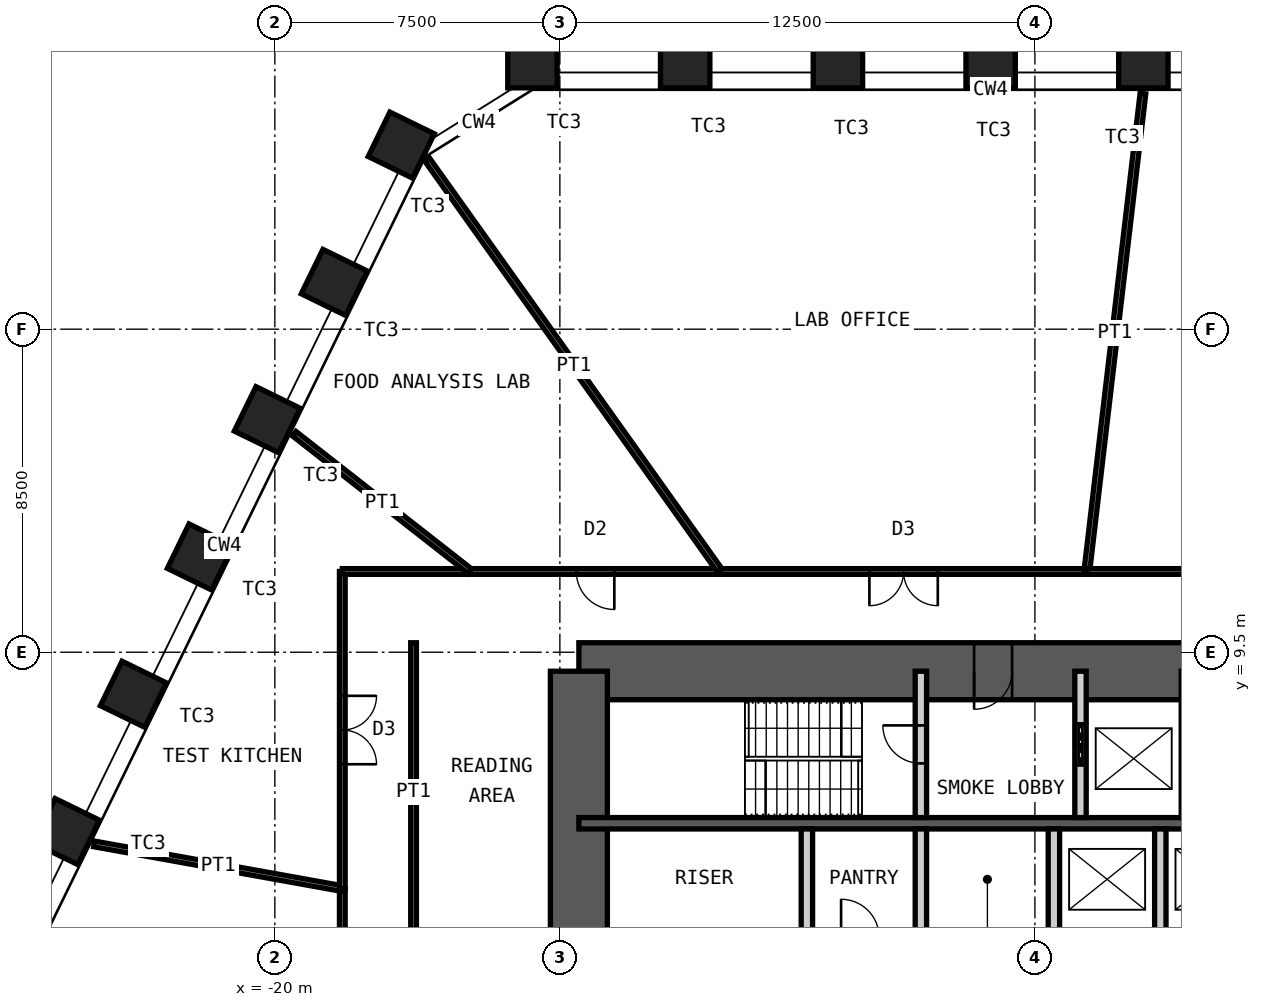
"""IFC4 building model, lengths in metres.
Left out: names, types, materials, properties, quantities, classifications, styles, units other than length and angle.
Written with IfcOpenShell. Run it as: python <this file> out.ifc"""

import sys

from ifc_helpers import new_model, si_unit, direction, frame, frame_2d, origin, origin_2d, place, context, subcontext, project, spatial, rectangle, hollow_rectangle, extrude, element, fill, save


model = new_model("IFC4")
c1 = context("Model", 3, precision=1e-05, world=origin(), true_north=direction((0.0, 1.0)))
c2 = subcontext(c1, "Body", "Model", "MODEL_VIEW")
j1 = project(units=[si_unit("LENGTHUNIT", "METRE"), si_unit("PLANEANGLEUNIT", "RADIAN")], contexts=[c1])
p1 = place(None, origin())
s1 = spatial("IfcSite", under=j1, at=p1, CompositionType="ELEMENT")
p2 = place(p1, origin())
s2 = spatial("IfcBuilding", under=s1, at=p2, CompositionType="ELEMENT")
p3 = place(p2, frame((0.0, 0.0, 128.2)))
s3 = spatial("IfcBuildingStorey", under=s2, at=p3, CompositionType="ELEMENT", Elevation=128.2)
for number, where, z_axis, x_axis in (
    (1, (-13.222, 25.0, 0.0), (0.0, 0.0, 1.0), (-1.0, 0.0, 0.0)),
    (2, (-9.203, 25.0, 0.0), (0.0, 0.0, 1.0), (-1.0, 0.0, 0.0)),
    (3, (-5.184, 25.0, 0.0), (0.0, 0.0, 1.0), (-1.0, 0.0, 0.0)),
    (4, (-1.165, 25.0, 0.0), (0.0, 0.0, 1.0), (-1.0, 0.0, 0.0)),
    (5, (2.854, 25.0, 0.0), (0.0, 0.0, 1.0), (-1.0, 0.0, 0.0)),
    (6, (-25.483, 4.781, 0.0), (0.0, 0.0, 1.0), (-0.438, -0.899, 0.0)),
    (7, (-23.721, 8.394, 0.0), (0.0, 0.0, 1.0), (-0.438, -0.899, 0.0)),
    (8, (-21.959, 12.006, 0.0), (0.0, 0.0, 1.0), (-0.438, -0.899, 0.0)),
    (9, (-20.198, 15.618, 0.0), (0.0, 0.0, 1.0), (-0.438, -0.899, 0.0)),
    (10, (-18.436, 19.23, 0.0), (0.0, 0.0, 1.0), (-0.438, -0.899, 0.0)),
    (11, (-16.674, 22.843, 0.0), (0.0, 0.0, 1.0), (-0.438, -0.899, 0.0)),
):
    element("IfcColumn", number, at=place(p3, frame(where, z_axis=z_axis, x_axis=x_axis)), inside=s3, PredefinedType="COLUMN", context=c2, shape_type="SweptSolid", body=[
        extrude(hollow_rectangle(XDim=1.3, YDim=1.3, WallThickness=0.1, at=origin_2d()), origin(), (0.0, 0.0, 1.0), 4.2),
    ])
p4 = place(p3, frame((-12.0, 9.0, 0.0), z_axis=(0.0, 0.0, 1.0), x_axis=(1.0, 0.0, 0.0)))
e12 = element("IfcWall", 12, at=p4, inside=s3, PredefinedType="SHEAR", context=c2, shape_type="SweptSolid", body=[
    extrude(rectangle(XDim=24.0, YDim=1.5, at=frame_2d((12.0, 0.0))), origin(), (0.0, 0.0, 1.0), 4.2),
])
p5 = place(p4, frame((10.4, 0.0, 0.0)))
e13 = element("IfcOpeningElement", 13, at=p5, cuts=e12, PredefinedType="OPENING", context=c2, shape_type="SweptSolid", body=[
    extrude(rectangle(XDim=1.0, YDim=2.1, at=frame_2d((0.5, 1.05))), frame((0.0, 0.76, 0.0), z_axis=(0.0, -1.0, 0.0), x_axis=(1.0, 0.0, 0.0)), (0.0, 0.0, 1.0), 1.52),
])
p6 = place(p4, frame((17.6, 0.0, 0.0)))
e14 = element("IfcOpeningElement", 14, at=p6, cuts=e12, PredefinedType="OPENING", context=c2, shape_type="SweptSolid", body=[
    extrude(rectangle(XDim=0.9, YDim=2.1, at=frame_2d((0.45, 1.05))), frame((0.0, 0.76, 0.0), z_axis=(0.0, -1.0, 0.0), x_axis=(1.0, 0.0, 0.0)), (0.0, 0.0, 1.0), 1.52),
])
p7 = place(p4, frame((21.9, 0.0, 0.0)))
e15 = element("IfcOpeningElement", 15, at=p7, cuts=e12, PredefinedType="OPENING", context=c2, shape_type="SweptSolid", body=[
    extrude(rectangle(XDim=0.9, YDim=2.1, at=frame_2d((0.45, 1.05))), frame((0.0, 0.76, 0.0), z_axis=(0.0, -1.0, 0.0), x_axis=(1.0, 0.0, 0.0)), (0.0, 0.0, 1.0), 1.52),
])
p8 = place(p3, frame((-12.0, -9.0, 0.0), z_axis=(0.0, 0.0, 1.0), x_axis=(0.0, 1.0, 0.0)))
e16 = element("IfcWall", 16, at=p8, inside=s3, PredefinedType="SHEAR", context=c2, shape_type="SweptSolid", body=[
    extrude(rectangle(XDim=18.0, YDim=1.5, at=frame_2d((9.0, 0.0))), origin(), (0.0, 0.0, 1.0), 4.2),
])
p9 = place(p8, frame((8.1, 0.0, 0.0)))
e17 = element("IfcOpeningElement", 17, at=p9, cuts=e16, PredefinedType="OPENING", context=c2, shape_type="SweptSolid", body=[
    extrude(rectangle(XDim=1.8, YDim=2.1, at=frame_2d((0.9, 1.05))), frame((0.0, 0.76, 0.0), z_axis=(0.0, -1.0, 0.0), x_axis=(1.0, 0.0, 0.0)), (0.0, 0.0, 1.0), 1.52),
])
p10 = place(p3, frame((-12.0, 5.0, 0.0), z_axis=(0.0, 0.0, 1.0), x_axis=(1.0, 0.0, 0.0)))
e18 = element("IfcWall", 18, at=p10, inside=s3, PredefinedType="SHEAR", context=c2, shape_type="SweptSolid", body=[
    extrude(rectangle(XDim=24.0, YDim=0.3, at=frame_2d((12.0, 0.0))), origin(), (0.0, 0.0, 1.0), 4.2),
])
p11 = place(p3, frame((-3.0, 5.15, 0.0), z_axis=(0.0, 0.0, 1.0), x_axis=(0.0, 1.0, 0.0)))
e19 = element("IfcWall", 19, at=p11, inside=s3, PredefinedType="PARTITIONING", context=c2, shape_type="SweptSolid", body=[
    extrude(rectangle(XDim=3.85, YDim=0.3, at=frame_2d((1.925, 0.0))), origin(), (0.0, 0.0, 1.0), 3.98),
])
p12 = place(p11, frame((1.425, 0.0, 0.0)))
e20 = element("IfcOpeningElement", 20, at=p12, cuts=e19, PredefinedType="OPENING", context=c2, shape_type="SweptSolid", body=[
    extrude(rectangle(XDim=1.0, YDim=2.1, at=frame_2d((0.5, 1.05))), frame((0.0, 0.16, 0.0), z_axis=(0.0, -1.0, 0.0), x_axis=(1.0, 0.0, 0.0)), (0.0, 0.0, 1.0), 0.32),
])
p13 = place(p3, frame((1.2, 5.15, 0.0), z_axis=(0.0, 0.0, 1.0), x_axis=(0.0, 1.0, 0.0)))
e21 = element("IfcWall", 21, at=p13, inside=s3, PredefinedType="PARTITIONING", context=c2, shape_type="SweptSolid", body=[
    extrude(rectangle(XDim=3.85, YDim=0.3, at=frame_2d((1.925, 0.0))), origin(), (0.0, 0.0, 1.0), 3.98),
])
p14 = place(p13, frame((1.375, 0.0, 0.0)))
e22 = element("IfcOpeningElement", 22, at=p14, cuts=e21, PredefinedType="OPENING", context=c2, shape_type="SweptSolid", body=[
    extrude(rectangle(XDim=1.1, YDim=2.4, at=frame_2d((0.55, 1.2))), frame((0.0, 0.16, 0.0), z_axis=(0.0, -1.0, 0.0), x_axis=(1.0, 0.0, 0.0)), (0.0, 0.0, 1.0), 0.32),
])
p15 = place(p3, frame((4.0, 5.15, 0.0), z_axis=(0.0, 0.0, 1.0), x_axis=(0.0, 1.0, 0.0)))
e23 = element("IfcWall", 23, at=p15, inside=s3, PredefinedType="PARTITIONING", context=c2, shape_type="SweptSolid", body=[
    extrude(rectangle(XDim=3.85, YDim=0.3, at=frame_2d((1.925, 0.0))), origin(), (0.0, 0.0, 1.0), 3.98),
])
for number, where, z_axis, x_axis in (
    (24, (-6.0, 2.2, 0.0), (0.0, 0.0, 1.0), (0.0, 1.0, 0.0)),
    (25, (-3.0, 2.2, 0.0), (0.0, 0.0, 1.0), (0.0, 1.0, 0.0)),
    (26, (0.5, 2.2, 0.0), (0.0, 0.0, 1.0), (0.0, 1.0, 0.0)),
    (27, (3.3, 2.2, 0.0), (0.0, 0.0, 1.0), (0.0, 1.0, 0.0)),
):
    element("IfcWall", number, at=place(p3, frame(where, z_axis=z_axis, x_axis=x_axis)), inside=s3, PredefinedType="PARTITIONING", context=c2, shape_type="SweptSolid", body=[
        extrude(rectangle(XDim=2.65, YDim=0.3, at=frame_2d((1.325, 0.0))), origin(), (0.0, 0.0, 1.0), 3.98),
    ])
p16 = place(p3, frame((-18.225, -7.849, 0.0), z_axis=(0.0, 0.0, 1.0), x_axis=(0.0, 1.0, 0.0)))
e28 = element("IfcWall", 28, at=p16, inside=s3, PredefinedType="PARTITIONING", context=c2, shape_type="SweptSolid", body=[
    extrude(rectangle(XDim=11.13, YDim=0.15, at=frame_2d((5.565, 0.0))), origin(), (0.0, 0.0, 1.0), 4.03),
])
p17 = place(p16, frame((4.665, 0.0, 0.0)))
e29 = element("IfcOpeningElement", 29, at=p17, cuts=e28, PredefinedType="OPENING", context=c2, shape_type="SweptSolid", body=[
    extrude(rectangle(XDim=1.8, YDim=2.4, at=frame_2d((0.9, 1.2))), frame((0.0, 0.085, 0.0), z_axis=(0.0, -1.0, 0.0), x_axis=(1.0, 0.0, 0.0)), (0.0, 0.0, 1.0), 0.17),
])
p18 = place(p3, frame((-24.755, 4.457, 0.0), z_axis=(0.0, 0.0, 1.0), x_axis=(0.984174598206, -0.177201467959, 0.0)))
e30 = element("IfcWall", 30, at=p18, inside=s3, PredefinedType="PARTITIONING", context=c2, shape_type="SweptSolid", body=[
    extrude(rectangle(XDim=6.635, YDim=0.15, at=frame_2d((3.318, 0.0))), origin(), (0.0, 0.0, 1.0), 3.33),
])
p19 = place(p3, frame((-18.225, 3.281, 0.0), z_axis=(0.0, 0.0, 1.0), x_axis=(0.0, 1.0, 0.0)))
e31 = element("IfcWall", 31, at=p19, inside=s3, PredefinedType="PARTITIONING", context=c2, shape_type="SweptSolid", body=[
    extrude(rectangle(XDim=8.344, YDim=0.15, at=frame_2d((4.172, 0.0))), origin(), (0.0, 0.0, 1.0), 4.03),
])
p20 = place(p19, frame((3.272, 0.0, 0.0)))
e32 = element("IfcOpeningElement", 32, at=p20, cuts=e31, PredefinedType="OPENING", context=c2, shape_type="SweptSolid", body=[
    extrude(rectangle(XDim=1.8, YDim=2.4, at=frame_2d((0.9, 1.2))), frame((0.0, 0.085, 0.0), z_axis=(0.0, -1.0, 0.0), x_axis=(1.0, 0.0, 0.0)), (0.0, 0.0, 1.0), 0.17),
])
p21 = place(p3, frame((-18.225, 11.625, 0.0), z_axis=(0.0, 0.0, 1.0), x_axis=(1.0, 0.0, 0.0)))
e33 = element("IfcWall", 33, at=p21, inside=s3, PredefinedType="PARTITIONING", context=c2, shape_type="SweptSolid", body=[
    extrude(rectangle(XDim=3.368, YDim=0.15, at=frame_2d((1.684, 0.0))), origin(), (0.0, 0.0, 1.0), 4.03),
])
p22 = place(p3, frame((-19.49, 15.25, 0.0), z_axis=(0.0, 0.0, 1.0), x_axis=(0.787549668605, -0.616251182133, 0.0)))
e34 = element("IfcWall", 34, at=p22, inside=s3, PredefinedType="PARTITIONING", context=c2, shape_type="SweptSolid", body=[
    extrude(rectangle(XDim=5.882, YDim=0.15, at=frame_2d((2.941, 0.0))), origin(), (0.0, 0.0, 1.0), 3.33),
])
p23 = place(p3, frame((-14.857, 11.625, 0.0), z_axis=(0.0, 0.0, 1.0), x_axis=(1.0, 0.0, 0.0)))
e35 = element("IfcWall", 35, at=p23, inside=s3, PredefinedType="PARTITIONING", context=c2, shape_type="SweptSolid", body=[
    extrude(rectangle(XDim=6.581, YDim=0.15, at=frame_2d((3.29, 0.0))), origin(), (0.0, 0.0, 1.0), 4.03),
])
p24 = place(p23, frame((2.79, 0.0, 0.0)))
e36 = element("IfcOpeningElement", 36, at=p24, cuts=e35, PredefinedType="OPENING", context=c2, shape_type="SweptSolid", body=[
    extrude(rectangle(XDim=1.0, YDim=2.4, at=frame_2d((0.5, 1.2))), frame((0.0, 0.085, 0.0), z_axis=(0.0, -1.0, 0.0), x_axis=(1.0, 0.0, 0.0)), (0.0, 0.0, 1.0), 0.17),
])
p25 = place(p3, frame((-15.987, 22.455, 0.0), z_axis=(0.0, 0.0, 1.0), x_axis=(0.579969304452, -0.814638328274, 0.0)))
e37 = element("IfcWall", 37, at=p25, inside=s3, PredefinedType="PARTITIONING", context=c2, shape_type="SweptSolid", body=[
    extrude(rectangle(XDim=13.294, YDim=0.15, at=frame_2d((6.647, 0.0))), origin(), (0.0, 0.0, 1.0), 2.93),
])
p26 = place(p3, frame((-8.277, 11.625, 0.0), z_axis=(0.0, 0.0, 1.0), x_axis=(1.0, 0.0, 0.0)))
e38 = element("IfcWall", 38, at=p26, inside=s3, PredefinedType="PARTITIONING", context=c2, shape_type="SweptSolid", body=[
    extrude(rectangle(XDim=9.642, YDim=0.15, at=frame_2d((4.821, 0.0))), origin(), (0.0, 0.0, 1.0), 4.03),
])
p27 = place(p26, frame((3.921, 0.0, 0.0)))
e39 = element("IfcOpeningElement", 39, at=p27, cuts=e38, PredefinedType="OPENING", context=c2, shape_type="SweptSolid", body=[
    extrude(rectangle(XDim=1.8, YDim=2.4, at=frame_2d((0.9, 1.2))), frame((0.0, 0.085, 0.0), z_axis=(0.0, -1.0, 0.0), x_axis=(1.0, 0.0, 0.0)), (0.0, 0.0, 1.0), 0.17),
])
p28 = place(p3, frame((2.843, 24.201, 0.0), z_axis=(0.0, 0.0, 1.0), x_axis=(-0.116670084723, -0.993170726175, 0.0)))
e40 = element("IfcWall", 40, at=p28, inside=s3, PredefinedType="PARTITIONING", context=c2, shape_type="SweptSolid", body=[
    extrude(rectangle(XDim=12.662, YDim=0.15, at=frame_2d((6.331, 0.0))), origin(), (0.0, 0.0, 1.0), 3.33),
])
p29 = place(p3, frame((1.366, 11.625, 0.0), z_axis=(0.0, 0.0, 1.0), x_axis=(1.0, 0.0, 0.0)))
e41 = element("IfcWall", 41, at=p29, inside=s3, PredefinedType="PARTITIONING", context=c2, shape_type="SweptSolid", body=[
    extrude(rectangle(XDim=16.259, YDim=0.15, at=frame_2d((8.13, 0.0))), origin(), (0.0, 0.0, 1.0), 4.03),
])
p30 = place(p29, frame((7.23, 0.0, 0.0)))
e42 = element("IfcOpeningElement", 42, at=p30, cuts=e41, PredefinedType="OPENING", context=c2, shape_type="SweptSolid", body=[
    extrude(rectangle(XDim=1.8, YDim=2.4, at=frame_2d((0.9, 1.2))), frame((0.0, 0.085, 0.0), z_axis=(0.0, -1.0, 0.0), x_axis=(1.0, 0.0, 0.0)), (0.0, 0.0, 1.0), 0.17),
])
p31 = place(p3, frame((-16.35, 1.9, 0.0), z_axis=(0.0, 0.0, 1.0), x_axis=(0.0, 1.0, 0.0)))
e43 = element("IfcWall", 43, at=p31, inside=s3, PredefinedType="PARTITIONING", context=c2, shape_type="SweptSolid", body=[
    extrude(rectangle(XDim=7.85, YDim=0.15, at=frame_2d((3.925, 0.0))), origin(), (0.0, 0.0, 1.0), 4.03),
])
p32 = place(p5, origin())
e44 = element("IfcDoor", 44, at=p32, inside=s3, OperationType="SINGLE_SWING_LEFT", PredefinedType="DOOR", context=c2, shape_type="SweptSolid", body=[
    extrude(rectangle(XDim=1.0, YDim=2.1, at=frame_2d((0.5, 1.05))), frame((0.0, 0.025, 0.0), z_axis=(0.0, -1.0, 0.0), x_axis=(1.0, 0.0, 0.0)), (0.0, 0.0, 1.0), 0.05),
])
fill(e13, e44)
p33 = place(p12, origin())
e45 = element("IfcDoor", 45, at=p33, inside=s3, OperationType="SINGLE_SWING_LEFT", PredefinedType="DOOR", context=c2, shape_type="SweptSolid", body=[
    extrude(rectangle(XDim=1.0, YDim=2.1, at=frame_2d((0.5, 1.05))), frame((0.0, 0.025, 0.0), z_axis=(0.0, -1.0, 0.0), x_axis=(1.0, 0.0, 0.0)), (0.0, 0.0, 1.0), 0.05),
])
fill(e20, e45)
p34 = place(p14, origin())
e46 = element("IfcDoor", 46, at=p34, inside=s3, OperationType="DOUBLE_DOOR_SLIDING", PredefinedType="DOOR", context=c2, shape_type="SweptSolid", body=[
    extrude(rectangle(XDim=1.1, YDim=2.4, at=frame_2d((0.55, 1.2))), frame((0.0, 0.025, 0.0), z_axis=(0.0, -1.0, 0.0), x_axis=(1.0, 0.0, 0.0)), (0.0, 0.0, 1.0), 0.05),
])
fill(e22, e46)
p35 = place(p20, origin())
e47 = element("IfcDoor", 47, at=p35, inside=s3, OperationType="DOUBLE_DOOR_DOUBLE_SWING", PredefinedType="DOOR", context=c2, shape_type="SweptSolid", body=[
    extrude(rectangle(XDim=1.8, YDim=2.4, at=frame_2d((0.9, 1.2))), frame((0.0, 0.025, 0.0), z_axis=(0.0, -1.0, 0.0), x_axis=(1.0, 0.0, 0.0)), (0.0, 0.0, 1.0), 0.05),
])
fill(e32, e47)
p36 = place(p24, origin())
e48 = element("IfcDoor", 48, at=p36, inside=s3, OperationType="SINGLE_SWING_RIGHT", PredefinedType="DOOR", context=c2, shape_type="SweptSolid", body=[
    extrude(rectangle(XDim=1.0, YDim=2.4, at=frame_2d((0.5, 1.2))), frame((0.0, 0.025, 0.0), z_axis=(0.0, -1.0, 0.0), x_axis=(1.0, 0.0, 0.0)), (0.0, 0.0, 1.0), 0.05),
])
fill(e36, e48)
p37 = place(p27, origin())
e49 = element("IfcDoor", 49, at=p37, inside=s3, OperationType="DOUBLE_DOOR_DOUBLE_SWING", PredefinedType="DOOR", context=c2, shape_type="SweptSolid", body=[
    extrude(rectangle(XDim=1.8, YDim=2.4, at=frame_2d((0.9, 1.2))), frame((0.0, 0.025, 0.0), z_axis=(0.0, -1.0, 0.0), x_axis=(1.0, 0.0, 0.0)), (0.0, 0.0, 1.0), 0.05),
])
fill(e39, e49)
save(model, sys.argv[1])
